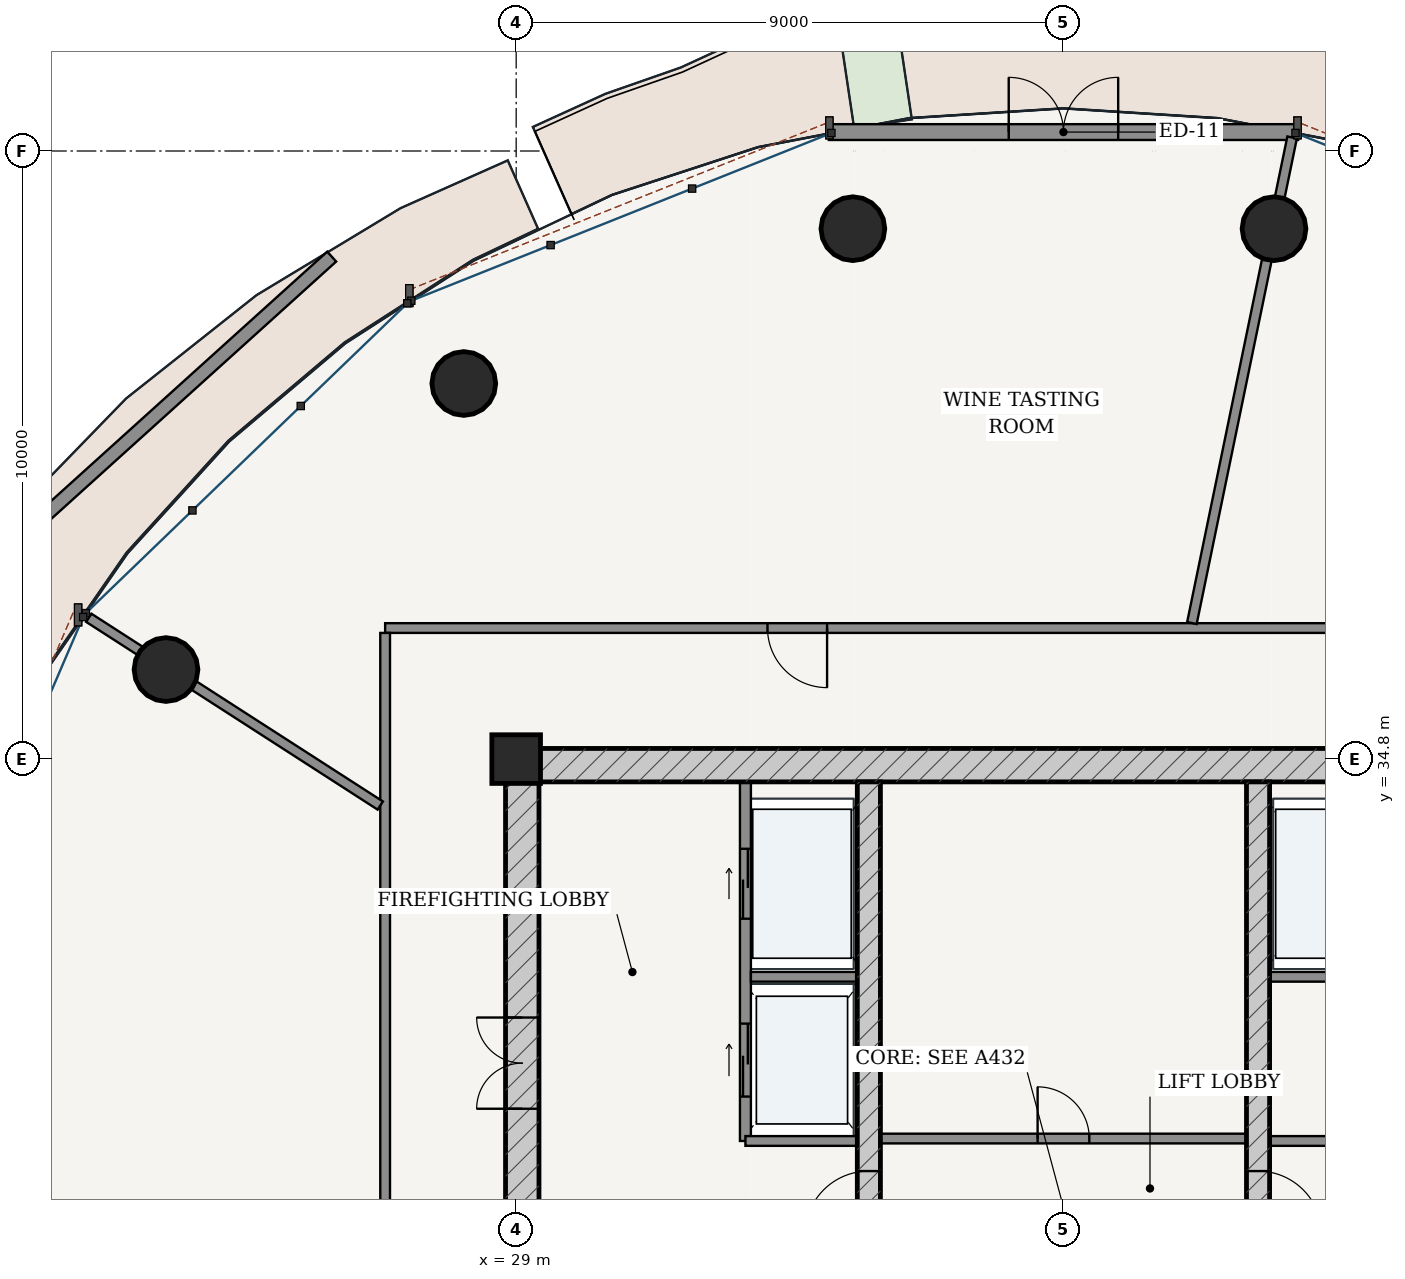
"""IFC4 building model, lengths in metres.
Left out: names, types, materials, properties, quantities, classifications, styles, units other than length and angle.
Written with IfcOpenShell. Run it as: python <this file> out.ifc"""

import sys

from ifc_helpers import new_model, si_unit, direction, frame, frame_2d, origin, origin_2d, place, context, subcontext, project, spatial, rectangle, hollow_circle, extrude, source, transform, mapped, element, fill, save


model = new_model("IFC4")
c1 = context("Model", 3, precision=1e-05, world=origin(), true_north=direction((-0.2419218956, 0.970295726276)))
c2 = subcontext(c1, "Body", "Model", "MODEL_VIEW")
j1 = project(units=[si_unit("LENGTHUNIT", "METRE"), si_unit("PLANEANGLEUNIT", "RADIAN")], contexts=[c1])
p1 = place(None, origin())
s1 = spatial("IfcSite", under=j1, at=p1, CompositionType="ELEMENT")
p2 = place(p1, origin())
s2 = spatial("IfcBuilding", under=s1, at=p2, CompositionType="ELEMENT")
p3 = place(p2, frame((0.0, 0.0, 243.0)))
s3 = spatial("IfcBuildingStorey", under=s2, at=p3, CompositionType="ELEMENT", Elevation=243.0)
p4 = place(p3, frame((29.0, 34.8, 0.0), z_axis=(0.0, 0.0, 1.0), x_axis=(1.0, 0.0, 0.0)))
e1 = element("IfcColumn", 1, at=p4, inside=s3, PredefinedType="COLUMN", context=c2, shape_type="SweptSolid", body=[
    extrude(rectangle(XDim=0.8, YDim=0.8, at=origin_2d()), origin(), (0.0, 0.0, 1.0), 5.2),
])
p5 = place(p3, frame((28.825, 34.7, 0.0), z_axis=(0.0, 0.0, 1.0), x_axis=(1.0, 0.0, 0.0)))
e2 = element("IfcWall", 2, at=p5, inside=s3, PredefinedType="SHEAR", context=c2, shape_type="SweptSolid", body=[
    extrude(rectangle(XDim=18.35, YDim=0.55, at=frame_2d((9.175, 0.0))), origin(), (0.0, 0.0, 1.0), 4.94),
])
p6 = place(p3, frame((29.1, 19.175, 0.0), z_axis=(0.0, 0.0, 1.0), x_axis=(0.0, 1.0, 0.0)))
e3 = element("IfcWall", 3, at=p6, inside=s3, PredefinedType="SHEAR", context=c2, shape_type="SweptSolid", body=[
    extrude(rectangle(XDim=15.25, YDim=0.55, at=frame_2d((7.625, 0.0))), origin(), (0.0, 0.0, 1.0), 4.94),
])
p7 = place(p6, frame((9.875, 0.0, 0.0)))
e4 = element("IfcOpeningElement", 4, at=p7, cuts=e3, PredefinedType="OPENING", context=c2, shape_type="SweptSolid", body=[
    extrude(rectangle(XDim=1.5, YDim=2.2, at=frame_2d((0.75, 1.1))), frame((0.0, 0.285, 0.0), z_axis=(0.0, -1.0, 0.0), x_axis=(1.0, 0.0, 0.0)), (0.0, 0.0, 1.0), 0.57),
])
p8 = place(p3, frame((34.8, 19.175, 0.0), z_axis=(0.0, 0.0, 1.0), x_axis=(0.0, 1.0, 0.0)))
e5 = element("IfcWall", 5, at=p8, inside=s3, PredefinedType="SHEAR", context=c2, shape_type="SweptSolid", body=[
    extrude(rectangle(XDim=15.25, YDim=0.38, at=frame_2d((7.625, 0.0))), origin(), (0.0, 0.0, 1.0), 4.94),
])
p9 = place(p8, frame((7.8, 0.0, 0.0)))
e6 = element("IfcOpeningElement", 6, at=p9, cuts=e5, PredefinedType="OPENING", context=c2, shape_type="SweptSolid", body=[
    extrude(rectangle(XDim=1.05, YDim=2.15, at=frame_2d((0.525, 1.075))), frame((0.0, 0.2, 0.0), z_axis=(0.0, -1.0, 0.0), x_axis=(1.0, 0.0, 0.0)), (0.0, 0.0, 1.0), 0.4),
])
p10 = place(p3, frame((41.2, 19.175, 0.0), z_axis=(0.0, 0.0, 1.0), x_axis=(0.0, 1.0, 0.0)))
e7 = element("IfcWall", 7, at=p10, inside=s3, PredefinedType="SHEAR", context=c2, shape_type="SweptSolid", body=[
    extrude(rectangle(XDim=15.25, YDim=0.38, at=frame_2d((7.625, 0.0))), origin(), (0.0, 0.0, 1.0), 4.94),
])
p11 = place(p10, frame((7.8, 0.0, 0.0)))
e8 = element("IfcOpeningElement", 8, at=p11, cuts=e7, PredefinedType="OPENING", context=c2, shape_type="SweptSolid", body=[
    extrude(rectangle(XDim=1.05, YDim=2.15, at=frame_2d((0.525, 1.075))), frame((0.0, 0.2, 0.0), z_axis=(0.0, -1.0, 0.0), x_axis=(1.0, 0.0, 0.0)), (0.0, 0.0, 1.0), 0.4),
])
for number, where, z_axis, x_axis in (
    (9, (41.463, 43.522, 0.0), (0.0, 0.0, 1.0), (1.0, 0.0, 0.0)),
    (10, (34.537, 43.522, 0.0), (0.0, 0.0, 1.0), (1.0, 0.0, 0.0)),
    (11, (28.139, 40.977, 0.0), (0.0, 0.0, 1.0), (1.0, 0.0, 0.0)),
    (12, (23.241, 36.272, 0.0), (0.0, 0.0, 1.0), (1.0, 0.0, 0.0)),
):
    element("IfcColumn", number, at=place(p3, frame(where, z_axis=z_axis, x_axis=x_axis)), inside=s3, PredefinedType="COLUMN", context=c2, shape_type="SweptSolid", body=[
        extrude(hollow_circle(Radius=0.525, WallThickness=0.035, at=origin_2d()), origin(), (0.0, 0.0, 1.0), 5.2),
    ])
p12 = place(p3, frame((41.859, 45.111, 0.0), z_axis=(0.0, 0.0, 1.0), x_axis=(-1.0, 0.0, 0.0)))
e13 = element("IfcWall", 13, at=p12, inside=s3, PredefinedType="SOLIDWALL", context=c2, shape_type="SweptSolid", body=[
    extrude(rectangle(XDim=7.718, YDim=0.26, at=frame_2d((3.859, 0.0))), origin(), (0.0, 0.0, 1.0), 4.94),
])
p13 = place(p12, frame((2.959, 0.0, 0.0)))
e14 = element("IfcOpeningElement", 14, at=p13, cuts=e13, PredefinedType="OPENING", context=c2, shape_type="SweptSolid", body=[
    extrude(rectangle(XDim=1.8, YDim=2.3, at=frame_2d((0.9, 1.15))), frame((0.0, 0.14, 0.0), z_axis=(0.0, -1.0, 0.0), x_axis=(1.0, 0.0, 0.0)), (0.0, 0.0, 1.0), 0.28),
])
p14 = place(p3, frame((25.966, 43.063, 0.0), z_axis=(0.0, 0.0, 1.0), x_axis=(-0.742166860765, -0.670215152606, 0.0)))
e15 = element("IfcWall", 15, at=p14, inside=s3, PredefinedType="PARAPET", context=c2, shape_type="SweptSolid", body=[
    extrude(rectangle(XDim=8.052, YDim=0.22, at=frame_2d((4.026, 0.0))), origin(), (0.0, 0.0, 1.0), 1.15),
])
p15 = place(p3, frame((32.77, 28.52, 0.0), z_axis=(0.0, 0.0, 1.0), x_axis=(0.0, 1.0, 0.0)))
e16 = element("IfcWall", 16, at=p15, inside=s3, PredefinedType="PARTITIONING", context=c2, shape_type="SweptSolid", body=[
    extrude(rectangle(XDim=5.905, YDim=0.18, at=frame_2d((2.953, 0.0))), origin(), (0.0, 0.0, 1.0), 4.94),
])
p16 = place(p15, frame((3.655, 0.0, 0.0)))
e17 = element("IfcOpeningElement", 17, at=p16, cuts=e16, PredefinedType="OPENING", context=c2, shape_type="SweptSolid", body=[
    extrude(rectangle(XDim=1.15, YDim=2.2, at=frame_2d((0.575, 1.1))), frame((0.0, 0.1, 0.0), z_axis=(0.0, -1.0, 0.0), x_axis=(1.0, 0.0, 0.0)), (0.0, 0.0, 1.0), 0.2),
])
p17 = place(p15, frame((0.73, 0.0, 0.0)))
e18 = element("IfcOpeningElement", 18, at=p17, cuts=e16, PredefinedType="OPENING", context=c2, shape_type="SweptSolid", body=[
    extrude(rectangle(XDim=1.2, YDim=2.25, at=frame_2d((0.6, 1.125))), frame((0.0, 0.1, 0.0), z_axis=(0.0, -1.0, 0.0), x_axis=(1.0, 0.0, 0.0)), (0.0, 0.0, 1.0), 0.2),
])
p18 = place(p3, frame((32.86, 31.22, 0.0), z_axis=(0.0, 0.0, 1.0), x_axis=(1.0, 0.0, 0.0)))
e19 = element("IfcWall", 19, at=p18, inside=s3, PredefinedType="PARTITIONING", context=c2, shape_type="SweptSolid", body=[
    extrude(rectangle(XDim=1.75, YDim=0.16, at=frame_2d((0.875, 0.0))), origin(), (0.0, 0.0, 1.0), 4.94),
])
p19 = place(p3, frame((32.77, 28.52, 0.0), z_axis=(0.0, 0.0, 1.0), x_axis=(1.0, 0.0, 0.0)))
e20 = element("IfcWall", 20, at=p19, inside=s3, PredefinedType="PARTITIONING", context=c2, shape_type="SweptSolid", body=[
    extrude(rectangle(XDim=1.84, YDim=0.16, at=frame_2d((0.92, 0.0))), origin(), (0.0, 0.0, 1.0), 4.94),
])
p20 = place(p3, frame((41.39, 31.22, 0.0), z_axis=(0.0, 0.0, 1.0), x_axis=(1.0, 0.0, 0.0)))
e21 = element("IfcWall", 21, at=p20, inside=s3, PredefinedType="PARTITIONING", context=c2, shape_type="SweptSolid", body=[
    extrude(rectangle(XDim=1.75, YDim=0.16, at=frame_2d((0.875, 0.0))), origin(), (0.0, 0.0, 1.0), 4.94),
])
p21 = place(p3, frame((41.39, 28.52, 0.0), z_axis=(0.0, 0.0, 1.0), x_axis=(1.0, 0.0, 0.0)))
e22 = element("IfcWall", 22, at=p21, inside=s3, PredefinedType="PARTITIONING", context=c2, shape_type="SweptSolid", body=[
    extrude(rectangle(XDim=1.84, YDim=0.16, at=frame_2d((0.92, 0.0))), origin(), (0.0, 0.0, 1.0), 4.94),
])
p22 = place(p3, frame((34.99, 28.56, 0.0), z_axis=(0.0, 0.0, 1.0), x_axis=(1.0, 0.0, 0.0)))
e23 = element("IfcWall", 23, at=p22, inside=s3, PredefinedType="PARTITIONING", context=c2, shape_type="SweptSolid", body=[
    extrude(rectangle(XDim=6.02, YDim=0.16, at=frame_2d((3.01, 0.0))), origin(), (0.0, 0.0, 1.0), 4.94),
])
p23 = place(p22, frame((2.585, 0.0, 0.0)))
e24 = element("IfcOpeningElement", 24, at=p23, cuts=e23, PredefinedType="OPENING", context=c2, shape_type="SweptSolid", body=[
    extrude(rectangle(XDim=0.85, YDim=2.1, at=frame_2d((0.425, 1.05))), frame((0.0, 0.09, 0.0), z_axis=(0.0, -1.0, 0.0), x_axis=(1.0, 0.0, 0.0)), (0.0, 0.0, 1.0), 0.18),
])
p24 = place(p3, frame((26.845, 36.955, 0.0), z_axis=(0.0, 0.0, 1.0), x_axis=(1.0, 0.0, 0.0)))
e25 = element("IfcWall", 25, at=p24, inside=s3, PredefinedType="PARTITIONING", context=c2, shape_type="SweptSolid", body=[
    extrude(rectangle(XDim=22.31, YDim=0.16, at=frame_2d((11.155, 0.0))), origin(), (0.0, 0.0, 1.0), 4.465),
])
p25 = place(p24, frame((17.154, 0.0, 0.0)))
e26 = element("IfcOpeningElement", 26, at=p25, cuts=e25, PredefinedType="OPENING", context=c2, shape_type="SweptSolid", body=[
    extrude(rectangle(XDim=0.98, YDim=2.2, at=frame_2d((0.49, 1.1))), frame((0.0, 0.09, 0.0), z_axis=(0.0, -1.0, 0.0), x_axis=(1.0, 0.0, 0.0)), (0.0, 0.0, 1.0), 0.18),
])
p26 = place(p24, frame((6.288, 0.0, 0.0)))
e27 = element("IfcOpeningElement", 27, at=p26, cuts=e25, PredefinedType="OPENING", context=c2, shape_type="SweptSolid", body=[
    extrude(rectangle(XDim=0.98, YDim=2.2, at=frame_2d((0.49, 1.1))), frame((0.0, 0.09, 0.0), z_axis=(0.0, -1.0, 0.0), x_axis=(1.0, 0.0, 0.0)), (0.0, 0.0, 1.0), 0.18),
])
p27 = place(p3, frame((26.845, 16.725, 0.0), z_axis=(0.0, 0.0, 1.0), x_axis=(0.0, 1.0, 0.0)))
e28 = element("IfcWall", 28, at=p27, inside=s3, PredefinedType="PARTITIONING", context=c2, shape_type="SweptSolid", body=[
    extrude(rectangle(XDim=20.15, YDim=0.16, at=frame_2d((10.075, 0.0))), origin(), (0.0, 0.0, 1.0), 4.465),
])
p28 = place(p27, frame((9.585, 0.0, 0.0)))
e29 = element("IfcOpeningElement", 29, at=p28, cuts=e28, PredefinedType="OPENING", context=c2, shape_type="SweptSolid", body=[
    extrude(rectangle(XDim=0.98, YDim=2.2, at=frame_2d((0.49, 1.1))), frame((0.0, 0.09, 0.0), z_axis=(0.0, -1.0, 0.0), x_axis=(1.0, 0.0, 0.0)), (0.0, 0.0, 1.0), 0.18),
])
p29 = place(p3, frame((40.113, 37.037, 0.0), z_axis=(0.0, 0.0, 1.0), x_axis=(0.202088793838, 0.979367203558, 0.0)))
e30 = element("IfcWall", 30, at=p29, inside=s3, PredefinedType="PARTITIONING", context=c2, shape_type="SweptSolid", body=[
    extrude(rectangle(XDim=8.155, YDim=0.16, at=frame_2d((4.077, 0.0))), origin(), (0.0, 0.0, 1.0), 4.465),
])
p30 = place(p3, frame((26.765, 34.036, 0.0), z_axis=(0.0, 0.0, 1.0), x_axis=(-0.84070098407, 0.541499635627, 0.0)))
e31 = element("IfcWall", 31, at=p30, inside=s3, PredefinedType="PARTITIONING", context=c2, shape_type="SweptSolid", body=[
    extrude(rectangle(XDim=5.702, YDim=0.16, at=frame_2d((2.851, 0.0))), origin(), (0.0, 0.0, 1.0), 4.465),
])
m1 = source(origin(), c2, "Body", "SweptSolid", [
    extrude(rectangle(XDim=1.8, YDim=2.3, at=frame_2d((0.9, 1.15))), frame((0.0, 0.025, 0.0), z_axis=(0.0, -1.0, 0.0), x_axis=(1.0, 0.0, 0.0)), (0.0, 0.0, 1.0), 0.05),
])
p31 = place(p13, frame((1.8, 0.0, 0.0), z_axis=(0.0, 0.0, 1.0), x_axis=(-1.0, 0.0, 0.0)))
e32 = element("IfcDoor", 32, at=p31, inside=s3, OperationType="DOUBLE_DOOR_SINGLE_SWING", PredefinedType="DOOR", context=c2, shape_type="MappedRepresentation", body=[
    mapped(m1, transform((0.0, 0.0, 0.0), scale=1.0)),
])
fill(e14, e32)
m2 = source(origin(), c2, "Body", "SweptSolid", [
    extrude(rectangle(XDim=1.5, YDim=2.2, at=frame_2d((0.75, 1.1))), frame((0.0, 0.025, 0.0), z_axis=(0.0, -1.0, 0.0), x_axis=(1.0, 0.0, 0.0)), (0.0, 0.0, 1.0), 0.05),
])
p32 = place(p7, origin())
e33 = element("IfcDoor", 33, at=p32, inside=s3, OperationType="DOUBLE_DOOR_SINGLE_SWING", PredefinedType="DOOR", context=c2, shape_type="MappedRepresentation", body=[
    mapped(m2, transform((0.0, 0.0, 0.0), scale=1.0)),
])
fill(e4, e33)
m3 = source(origin(), c2, "Body", "SweptSolid", [
    extrude(rectangle(XDim=1.05, YDim=2.15, at=frame_2d((0.525, 1.075))), frame((0.0, 0.025, 0.0), z_axis=(0.0, -1.0, 0.0), x_axis=(1.0, 0.0, 0.0)), (0.0, 0.0, 1.0), 0.05),
])
p33 = place(p9, origin())
e34 = element("IfcDoor", 34, at=p33, inside=s3, OperationType="SINGLE_SWING_LEFT", PredefinedType="DOOR", context=c2, shape_type="MappedRepresentation", body=[
    mapped(m3, transform((0.0, 0.0, 0.0), scale=1.0)),
])
fill(e6, e34)
p34 = place(p11, frame((1.05, 0.0, 0.0), z_axis=(0.0, 0.0, 1.0), x_axis=(-1.0, 0.0, 0.0)))
e35 = element("IfcDoor", 35, at=p34, inside=s3, OperationType="SINGLE_SWING_RIGHT", PredefinedType="DOOR", context=c2, shape_type="MappedRepresentation", body=[
    mapped(m3, transform((0.0, 0.0, 0.0), scale=1.0)),
])
fill(e8, e35)
m4 = source(origin(), c2, "Body", "SweptSolid", [
    extrude(rectangle(XDim=0.85, YDim=2.1, at=frame_2d((0.425, 1.05))), frame((0.0, 0.025, 0.0), z_axis=(0.0, -1.0, 0.0), x_axis=(1.0, 0.0, 0.0)), (0.0, 0.0, 1.0), 0.05),
])
p35 = place(p23, origin())
e36 = element("IfcDoor", 36, at=p35, inside=s3, OperationType="SINGLE_SWING_LEFT", PredefinedType="DOOR", context=c2, shape_type="MappedRepresentation", body=[
    mapped(m4, transform((0.0, 0.0, 0.0), scale=1.0)),
])
fill(e24, e36)
m5 = source(origin(), c2, "Body", "SweptSolid", [
    extrude(rectangle(XDim=1.15, YDim=2.2, at=frame_2d((0.575, 1.1))), frame((0.0, 0.025, 0.0), z_axis=(0.0, -1.0, 0.0), x_axis=(1.0, 0.0, 0.0)), (0.0, 0.0, 1.0), 0.05),
])
p36 = place(p16, origin())
e37 = element("IfcDoor", 37, at=p36, inside=s3, OperationType="DOUBLE_DOOR_SLIDING", PredefinedType="DOOR", context=c2, shape_type="MappedRepresentation", body=[
    mapped(m5, transform((0.0, 0.0, 0.0), scale=1.0)),
])
fill(e17, e37)
m6 = source(origin(), c2, "Body", "SweptSolid", [
    extrude(rectangle(XDim=1.2, YDim=2.25, at=frame_2d((0.6, 1.125))), frame((0.0, 0.025, 0.0), z_axis=(0.0, -1.0, 0.0), x_axis=(1.0, 0.0, 0.0)), (0.0, 0.0, 1.0), 0.05),
])
p37 = place(p17, origin())
e38 = element("IfcDoor", 38, at=p37, inside=s3, OperationType="DOUBLE_DOOR_SLIDING", PredefinedType="DOOR", context=c2, shape_type="MappedRepresentation", body=[
    mapped(m6, transform((0.0, 0.0, 0.0), scale=1.0)),
])
fill(e18, e38)
m7 = source(origin(), c2, "Body", "SweptSolid", [
    extrude(rectangle(XDim=0.98, YDim=2.2, at=frame_2d((0.49, 1.1))), frame((0.0, 0.025, 0.0), z_axis=(0.0, -1.0, 0.0), x_axis=(1.0, 0.0, 0.0)), (0.0, 0.0, 1.0), 0.05),
])
p38 = place(p26, frame((0.98, 0.0, 0.0), z_axis=(0.0, 0.0, 1.0), x_axis=(-1.0, 0.0, 0.0)))
e39 = element("IfcDoor", 39, at=p38, inside=s3, OperationType="SINGLE_SWING_LEFT", PredefinedType="DOOR", context=c2, shape_type="MappedRepresentation", body=[
    mapped(m7, transform((0.0, 0.0, 0.0), scale=1.0)),
])
fill(e27, e39)
save(model, sys.argv[1])
